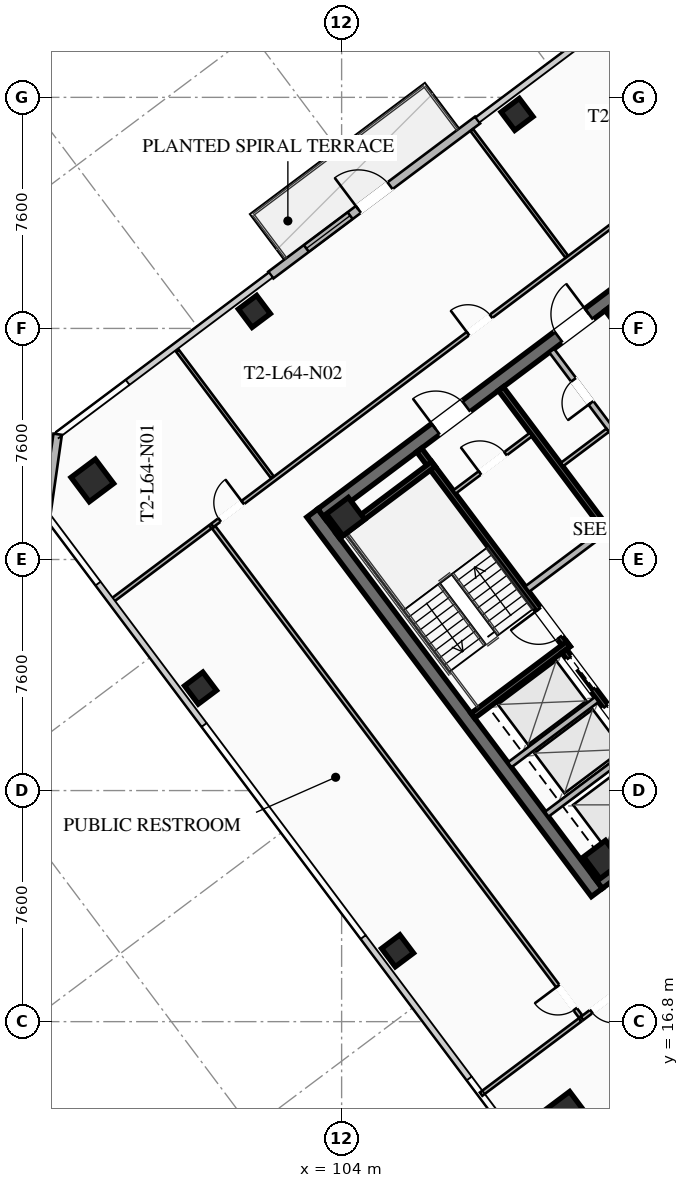
"""IFC4 building model, lengths in metres.
Left out: names, types, materials, properties, quantities, classifications, styles, units other than length and angle.
Written with IfcOpenShell. Run it as: python <this file> out.ifc"""

import sys

from ifc_helpers import new_model, si_unit, direction, frame, frame_2d, origin, origin_2d, place, context, subcontext, project, spatial, rectangle, hollow_rectangle, extrude, element, fill, save


model = new_model("IFC4")
c1 = context("Model", 3, precision=1e-05, world=origin(), true_north=direction((0.0, 1.0)))
c2 = subcontext(c1, "Body", "Model", "MODEL_VIEW")
j1 = project(units=[si_unit("LENGTHUNIT", "METRE"), si_unit("PLANEANGLEUNIT", "RADIAN")], contexts=[c1])
p1 = place(None, origin())
s1 = spatial("IfcSite", under=j1, at=p1, CompositionType="ELEMENT")
p2 = place(p1, origin())
s2 = spatial("IfcBuilding", under=s1, at=p2, CompositionType="ELEMENT")
p3 = place(p2, frame((0.0, 0.0, 236.15)))
s3 = spatial("IfcBuildingStorey", under=s2, at=p3, CompositionType="ELEMENT", Elevation=236.15)
p4 = place(p3, frame((112.396, 21.047, 0.0), z_axis=(0.0, 0.0, 1.0), x_axis=(-0.600005007985, 0.799996243986, 0.0)))
e1 = element("IfcWall", 1, at=p4, inside=s3, PredefinedType="SHEAR", context=c2, shape_type="SweptSolid", body=[
    extrude(rectangle(XDim=15.6, YDim=0.45, at=frame_2d((7.8, 0.0))), origin(), (0.0, 0.0, 1.0), 3.55),
])
p5 = place(p3, frame((124.649, 30.518, 0.0), z_axis=(0.0, 0.0, 1.0), x_axis=(-0.8, -0.6, 0.0)))
e2 = element("IfcWall", 2, at=p5, inside=s3, PredefinedType="SHEAR", context=c2, shape_type="SweptSolid", body=[
    extrude(rectangle(XDim=15.26, YDim=0.45, at=frame_2d((7.63, 0.0))), origin(), (0.0, 0.0, 1.0), 3.55),
])
p6 = place(p5, frame((9.33, 0.0, 0.0)))
e3 = element("IfcOpeningElement", 3, at=p6, cuts=e2, PredefinedType="OPENING", context=c2, shape_type="SweptSolid", body=[
    extrude(rectangle(XDim=1.25, YDim=2.25, at=frame_2d((0.625, 1.125))), frame((0.0, 0.235, 0.0), z_axis=(0.0, -1.0, 0.0), x_axis=(1.0, 0.0, 0.0)), (0.0, 0.0, 1.0), 0.47),
])
p7 = place(p5, frame((4.28, 0.0, 0.0)))
e4 = element("IfcOpeningElement", 4, at=p7, cuts=e2, PredefinedType="OPENING", context=c2, shape_type="SweptSolid", body=[
    extrude(rectangle(XDim=1.25, YDim=2.25, at=frame_2d((0.625, 1.125))), frame((0.0, 0.235, 0.0), z_axis=(0.0, -1.0, 0.0), x_axis=(1.0, 0.0, 0.0)), (0.0, 0.0, 1.0), 0.47),
])
p8 = place(p3, frame((103.351, 33.482, 0.0), z_axis=(0.0, 0.0, 1.0), x_axis=(0.8, 0.6, 0.0)))
e5 = element("IfcWall", 5, at=p8, inside=s3, PredefinedType="SHEAR", context=c2, shape_type="SweptSolid", body=[
    extrude(rectangle(XDim=15.26, YDim=0.45, at=frame_2d((7.63, 0.0))), origin(), (0.0, 0.0, 1.0), 3.55),
])
p9 = place(p8, frame((4.68, 0.0, 0.0)))
e6 = element("IfcOpeningElement", 6, at=p9, cuts=e5, PredefinedType="OPENING", context=c2, shape_type="SweptSolid", body=[
    extrude(rectangle(XDim=1.25, YDim=2.25, at=frame_2d((0.625, 1.125))), frame((0.0, 0.235, 0.0), z_axis=(0.0, -1.0, 0.0), x_axis=(1.0, 0.0, 0.0)), (0.0, 0.0, 1.0), 0.47),
])
p10 = place(p8, frame((9.73, 0.0, 0.0)))
e7 = element("IfcOpeningElement", 7, at=p10, cuts=e5, PredefinedType="OPENING", context=c2, shape_type="SweptSolid", body=[
    extrude(rectangle(XDim=1.25, YDim=2.25, at=frame_2d((0.625, 1.125))), frame((0.0, 0.235, 0.0), z_axis=(0.0, -1.0, 0.0), x_axis=(1.0, 0.0, 0.0)), (0.0, 0.0, 1.0), 0.47),
])
for number, where, z_axis, x_axis in (
    (8, (112.59, 22.13, 0.0), (0.0, 0.0, 1.0), (0.8, 0.6, 0.0)),
    (9, (104.13, 33.41, 0.0), (0.0, 0.0, 1.0), (0.8, 0.6, 0.0)),
):
    element("IfcColumn", number, at=place(p3, frame(where, z_axis=z_axis, x_axis=x_axis)), inside=s3, PredefinedType="COLUMN", context=c2, shape_type="SweptSolid", body=[
        extrude(hollow_rectangle(XDim=0.9, YDim=0.9, WallThickness=0.04, at=origin_2d()), origin(), (0.0, 0.0, 1.0), 3.37),
    ])
for number, where, z_axis, x_axis in (
    (10, (111.4, 13.8, 0.0), (0.0, 0.0, 1.0), (0.8, 0.6, 0.0)),
    (11, (95.8, 34.6, 0.0), (0.0, 0.0, 1.0), (0.8, 0.6, 0.0)),
):
    element("IfcColumn", number, at=place(p3, frame(where, z_axis=z_axis, x_axis=x_axis)), inside=s3, PredefinedType="COLUMN", context=c2, shape_type="SweptSolid", body=[
        extrude(hollow_rectangle(XDim=1.0, YDim=1.0, WallThickness=0.04, at=origin_2d()), origin(), (0.0, 0.0, 1.0), 3.37),
    ])
for number, where, z_axis, x_axis in (
    (12, (109.77, 46.64, 0.0), (0.0, 0.0, 1.0), (0.8, 0.6, 0.0)),
    (13, (101.13, 40.16, 0.0), (0.0, 0.0, 1.0), (0.8, 0.6, 0.0)),
    (14, (99.36, 27.77, 0.0), (0.0, 0.0, 1.0), (0.8, 0.6, 0.0)),
    (15, (105.84, 19.13, 0.0), (0.0, 0.0, 1.0), (0.8, 0.6, 0.0)),
):
    element("IfcColumn", number, at=place(p3, frame(where, z_axis=z_axis, x_axis=x_axis)), inside=s3, PredefinedType="COLUMN", context=c2, shape_type="SweptSolid", body=[
        extrude(hollow_rectangle(XDim=0.75, YDim=0.75, WallThickness=0.032, at=origin_2d()), origin(), (0.0, 0.0, 1.0), 3.37),
    ])
p11 = place(p3, frame((101.672, 41.354, 0.0), z_axis=(0.0, 0.0, 1.0), x_axis=(0.799986212866, 0.600018382406, 0.0)))
e16 = element("IfcWall", 16, at=p11, inside=s3, PredefinedType="SOLIDWALL", context=c2, shape_type="SweptSolid", body=[
    extrude(rectangle(XDim=8.5, YDim=0.28, at=frame_2d((4.25, 0.0))), origin(), (0.0, 0.0, 1.0), 3.37),
])
p12 = place(p11, frame((3.6, 0.0, 0.0)))
e17 = element("IfcOpeningElement", 17, at=p12, cuts=e16, PredefinedType="OPENING", context=c2, shape_type="SweptSolid", body=[
    extrude(rectangle(XDim=1.3, YDim=2.15, at=frame_2d((0.65, 1.075))), frame((0.0, 0.15, 0.0), z_axis=(0.0, -1.0, 0.0), x_axis=(1.0, 0.0, 0.0)), (0.0, 0.0, 1.0), 0.3),
])
p13 = place(p11, frame((1.46, 0.0, 0.85)))
e18 = element("IfcOpeningElement", 18, at=p13, cuts=e16, PredefinedType="OPENING", context=c2, shape_type="SweptSolid", body=[
    extrude(rectangle(XDim=1.8, YDim=1.92, at=frame_2d((0.9, 0.96))), frame((0.0, 0.15, 0.0), z_axis=(0.0, -1.0, 0.0), x_axis=(1.0, 0.0, 0.0)), (0.0, 0.0, 1.0), 0.3),
])
p14 = place(p3, frame((94.28, 33.46, 0.0), z_axis=(0.0, 0.0, 1.0), x_axis=(0.141370477216, 0.989956760759, 0.0)))
e19 = element("IfcWall", 19, at=p14, inside=s3, PredefinedType="SOLIDWALL", context=c2, shape_type="SweptSolid", body=[
    extrude(rectangle(XDim=2.687, YDim=0.28, at=frame_2d((1.344, 0.0))), origin(), (0.0, 0.0, 1.0), 3.37),
])
p15 = place(p3, frame((111.44, 29.08, 0.0), z_axis=(0.0, 0.0, 1.0), x_axis=(-0.59999041401, 0.800007189403, 0.0)))
e20 = element("IfcWall", 20, at=p15, inside=s3, PredefinedType="SHEAR", context=c2, shape_type="SweptSolid", body=[
    extrude(rectangle(XDim=8.15, YDim=0.2, at=frame_2d((4.075, 0.0))), origin(), (0.0, 0.0, 1.0), 3.37),
])
p16 = place(p15, frame((0.45, 0.0, 0.0)))
e21 = element("IfcOpeningElement", 21, at=p16, cuts=e20, PredefinedType="OPENING", context=c2, shape_type="SweptSolid", body=[
    extrude(rectangle(XDim=1.15, YDim=2.2, at=frame_2d((0.575, 1.1))), frame((0.0, 0.11, 0.0), z_axis=(0.0, -1.0, 0.0), x_axis=(1.0, 0.0, 0.0)), (0.0, 0.0, 1.0), 0.22),
])
for number, where, z_axis, x_axis in (
    (22, (108.316, 26.862, 0.0), (0.0, 0.0, 1.0), (0.8, 0.6, 0.0)),
    (23, (103.876, 32.782, 0.0), (0.0, 0.0, 1.0), (0.8, 0.6, 0.0)),
):
    element("IfcWall", number, at=place(p3, frame(where, z_axis=z_axis, x_axis=x_axis)), inside=s3, PredefinedType="SHEAR", context=c2, shape_type="SweptSolid", body=[
        extrude(rectangle(XDim=3.93, YDim=0.2, at=frame_2d((1.965, 0.0))), origin(), (0.0, 0.0, 1.0), 3.37),
    ])
p17 = place(p3, frame((118.058, 25.856, 0.0), z_axis=(0.0, 0.0, 1.0), x_axis=(-0.600002657301, 0.799998007018, 0.0)))
e24 = element("IfcWall", 24, at=p17, inside=s3, PredefinedType="SHEAR", context=c2, shape_type="SweptSolid", body=[
    extrude(rectangle(XDim=14.7, YDim=0.2, at=frame_2d((7.35, 0.0))), origin(), (0.0, 0.0, 1.0), 3.37),
])
p18 = place(p3, frame((110.104, 31.028, 0.0), z_axis=(0.0, 0.0, 1.0), x_axis=(0.800018601094, 0.59997519774, 0.0)))
e25 = element("IfcWall", 25, at=p18, inside=s3, PredefinedType="SOLIDWALL", context=c2, shape_type="SweptSolid", body=[
    extrude(rectangle(XDim=3.15, YDim=0.22, at=frame_2d((1.575, 0.0))), origin(), (0.0, 0.0, 1.0), 2.723),
])
p19 = place(p3, frame((115.25, 23.75, 0.0), z_axis=(0.0, 0.0, 1.0), x_axis=(-0.599994036198, 0.800004472816, 0.0)))
e26 = element("IfcWall", 26, at=p19, inside=s3, PredefinedType="SHEAR", context=c2, shape_type="SweptSolid", body=[
    extrude(rectangle(XDim=6.55, YDim=0.2, at=frame_2d((3.275, 0.0))), origin(), (0.0, 0.0, 1.0), 3.37),
])
p20 = place(p19, frame((4.975, 0.0, 0.0)))
e27 = element("IfcOpeningElement", 27, at=p20, cuts=e26, PredefinedType="OPENING", context=c2, shape_type="SweptSolid", body=[
    extrude(rectangle(XDim=1.3, YDim=2.25, at=frame_2d((0.65, 1.125))), frame((0.0, 0.11, 0.0), z_axis=(0.0, -1.0, 0.0), x_axis=(1.0, 0.0, 0.0)), (0.0, 0.0, 1.0), 0.22),
])
p21 = place(p19, frame((2.975, 0.0, 0.0)))
e28 = element("IfcOpeningElement", 28, at=p21, cuts=e26, PredefinedType="OPENING", context=c2, shape_type="SweptSolid", body=[
    extrude(rectangle(XDim=1.3, YDim=2.25, at=frame_2d((0.65, 1.125))), frame((0.0, 0.11, 0.0), z_axis=(0.0, -1.0, 0.0), x_axis=(1.0, 0.0, 0.0)), (0.0, 0.0, 1.0), 0.22),
])
p22 = place(p19, frame((0.775, 0.0, 0.0)))
e29 = element("IfcOpeningElement", 29, at=p22, cuts=e26, PredefinedType="OPENING", context=c2, shape_type="SweptSolid", body=[
    extrude(rectangle(XDim=1.3, YDim=2.25, at=frame_2d((0.65, 1.125))), frame((0.0, 0.11, 0.0), z_axis=(0.0, -1.0, 0.0), x_axis=(1.0, 0.0, 0.0)), (0.0, 0.0, 1.0), 0.22),
])
for number, where, z_axis, x_axis in (
    (30, (110.746, 23.622, 0.0), (0.0, 0.0, 1.0), (0.8, 0.6, 0.0)),
    (31, (109.528, 25.246, 0.0), (0.0, 0.0, 1.0), (0.8, 0.6, 0.0)),
):
    element("IfcWall", number, at=place(p3, frame(where, z_axis=z_axis, x_axis=x_axis)), inside=s3, PredefinedType="SOLIDWALL", context=c2, shape_type="SweptSolid", body=[
        extrude(rectangle(XDim=3.58, YDim=0.2, at=frame_2d((1.79, 0.0))), origin(), (0.0, 0.0, 1.0), 3.37),
    ])
p23 = place(p3, frame((112.75, 40.25, 0.0), z_axis=(0.0, 0.0, 1.0), x_axis=(0.599994036198, -0.800004472816, 0.0)))
e32 = element("IfcWall", 32, at=p23, inside=s3, PredefinedType="SHEAR", context=c2, shape_type="SweptSolid", body=[
    extrude(rectangle(XDim=6.55, YDim=0.2, at=frame_2d((3.275, 0.0))), origin(), (0.0, 0.0, 1.0), 3.37),
])
p24 = place(p23, frame((5.075, 0.0, 0.0)))
e33 = element("IfcOpeningElement", 33, at=p24, cuts=e32, PredefinedType="OPENING", context=c2, shape_type="SweptSolid", body=[
    extrude(rectangle(XDim=1.1, YDim=2.2, at=frame_2d((0.55, 1.1))), frame((0.0, 0.11, 0.0), z_axis=(0.0, -1.0, 0.0), x_axis=(1.0, 0.0, 0.0)), (0.0, 0.0, 1.0), 0.22),
])
p25 = place(p23, frame((3.025, 0.0, 0.0)))
e34 = element("IfcOpeningElement", 34, at=p25, cuts=e32, PredefinedType="OPENING", context=c2, shape_type="SweptSolid", body=[
    extrude(rectangle(XDim=1.1, YDim=2.2, at=frame_2d((0.55, 1.1))), frame((0.0, 0.11, 0.0), z_axis=(0.0, -1.0, 0.0), x_axis=(1.0, 0.0, 0.0)), (0.0, 0.0, 1.0), 0.22),
])
p26 = place(p23, frame((1.025, 0.0, 0.0)))
e35 = element("IfcOpeningElement", 35, at=p26, cuts=e32, PredefinedType="OPENING", context=c2, shape_type="SweptSolid", body=[
    extrude(rectangle(XDim=1.1, YDim=2.2, at=frame_2d((0.55, 1.1))), frame((0.0, 0.11, 0.0), z_axis=(0.0, -1.0, 0.0), x_axis=(1.0, 0.0, 0.0)), (0.0, 0.0, 1.0), 0.22),
])
p27 = place(p3, frame((107.71, 34.22, 0.0), z_axis=(0.0, 0.0, 1.0), x_axis=(0.799981399002, 0.60002480053, 0.0)))
e36 = element("IfcWall", 36, at=p27, inside=s3, PredefinedType="PARTITIONING", context=c2, shape_type="SweptSolid", body=[
    extrude(rectangle(XDim=3.15, YDim=0.135, at=frame_2d((1.575, 0.0))), origin(), (0.0, 0.0, 1.0), 2.723),
])
p28 = place(p27, frame((1.05, 0.0, 0.0)))
e37 = element("IfcOpeningElement", 37, at=p28, cuts=e36, PredefinedType="OPENING", context=c2, shape_type="SweptSolid", body=[
    extrude(rectangle(XDim=1.05, YDim=2.2, at=frame_2d((0.525, 1.1))), frame((0.0, 0.077, 0.0), z_axis=(0.0, -1.0, 0.0), x_axis=(1.0, 0.0, 0.0)), (0.0, 0.0, 1.0), 0.155),
])
p29 = place(p3, frame((115.11, 33.27, 0.0), z_axis=(0.0, 0.0, 1.0), x_axis=(-0.600011160345, 0.79999162962, 0.0)))
e38 = element("IfcWall", 38, at=p29, inside=s3, PredefinedType="SOLIDWALL", context=c2, shape_type="SweptSolid", body=[
    extrude(rectangle(XDim=7.0, YDim=0.2, at=frame_2d((3.5, 0.0))), origin(), (0.0, 0.0, 1.0), 2.723),
])
p30 = place(p29, frame((0.85, 0.0, 0.0)))
e39 = element("IfcOpeningElement", 39, at=p30, cuts=e38, PredefinedType="OPENING", context=c2, shape_type="SweptSolid", body=[
    extrude(rectangle(XDim=0.95, YDim=2.05, at=frame_2d((0.475, 1.025))), frame((0.0, 0.11, 0.0), z_axis=(0.0, -1.0, 0.0), x_axis=(1.0, 0.0, 0.0)), (0.0, 0.0, 1.0), 0.22),
])
p31 = place(p29, frame((4.85, 0.0, 0.0)))
e40 = element("IfcOpeningElement", 40, at=p31, cuts=e38, PredefinedType="OPENING", context=c2, shape_type="SweptSolid", body=[
    extrude(rectangle(XDim=0.95, YDim=2.05, at=frame_2d((0.475, 1.025))), frame((0.0, 0.11, 0.0), z_axis=(0.0, -1.0, 0.0), x_axis=(1.0, 0.0, 0.0)), (0.0, 0.0, 1.0), 0.22),
])
p32 = place(p3, frame((111.246, 35.122, 0.0), z_axis=(0.0, 0.0, 1.0), x_axis=(0.8, 0.6, 0.0)))
e41 = element("IfcWall", 41, at=p32, inside=s3, PredefinedType="PARTITIONING", context=c2, shape_type="SweptSolid", body=[
    extrude(rectangle(XDim=1.88, YDim=0.135, at=frame_2d((0.94, 0.0))), origin(), (0.0, 0.0, 1.0), 2.723),
])
p33 = place(p3, frame((99.746, 33.122, 0.0), z_axis=(0.0, 0.0, 1.0), x_axis=(0.800001242445, 0.599998343403, 0.0)))
e42 = element("IfcWall", 42, at=p33, inside=s3, PredefinedType="PARTITIONING", context=c2, shape_type="SweptSolid", body=[
    extrude(rectangle(XDim=23.58, YDim=0.135, at=frame_2d((11.79, 0.0))), origin(), (0.0, 0.0, 1.0), 2.723),
])
p34 = place(p33, frame((0.3, 0.0, 0.0)))
e43 = element("IfcOpeningElement", 43, at=p34, cuts=e42, PredefinedType="OPENING", context=c2, shape_type="SweptSolid", body=[
    extrude(rectangle(XDim=0.95, YDim=2.05, at=frame_2d((0.475, 1.025))), frame((0.0, 0.077, 0.0), z_axis=(0.0, -1.0, 0.0), x_axis=(1.0, 0.0, 0.0)), (0.0, 0.0, 1.0), 0.155),
])
p35 = place(p33, frame((10.512, 0.0, 0.0)))
e44 = element("IfcOpeningElement", 44, at=p35, cuts=e42, PredefinedType="OPENING", context=c2, shape_type="SweptSolid", body=[
    extrude(rectangle(XDim=0.95, YDim=2.05, at=frame_2d((0.475, 1.025))), frame((0.0, 0.077, 0.0), z_axis=(0.0, -1.0, 0.0), x_axis=(1.0, 0.0, 0.0)), (0.0, 0.0, 1.0), 0.155),
])
p36 = place(p33, frame((22.33, 0.0, 0.0)))
e45 = element("IfcOpeningElement", 45, at=p36, cuts=e42, PredefinedType="OPENING", context=c2, shape_type="SweptSolid", body=[
    extrude(rectangle(XDim=0.95, YDim=2.05, at=frame_2d((0.475, 1.025))), frame((0.0, 0.077, 0.0), z_axis=(0.0, -1.0, 0.0), x_axis=(1.0, 0.0, 0.0)), (0.0, 0.0, 1.0), 0.155),
])
for number, where, z_axis, x_axis in (
    (46, (101.722, 34.704, 0.0), (0.0, 0.0, 1.0), (-0.6, 0.8, 0.0)),
    (47, (111.402, 41.964, 0.0), (0.0, 0.0, 1.0), (-0.6, 0.8, 0.0)),
):
    element("IfcWall", number, at=place(p3, frame(where, z_axis=z_axis, x_axis=x_axis)), inside=s3, PredefinedType="PARTITIONING", context=c2, shape_type="SweptSolid", body=[
        extrude(rectangle(XDim=5.2, YDim=0.11, at=frame_2d((2.6, 0.0))), origin(), (0.0, 0.0, 1.0), 2.723),
    ])
p37 = place(p3, frame((124.012, 25.984, 0.0), z_axis=(0.0, 0.0, 1.0), x_axis=(-0.800003872688, -0.599994836382, 0.0)))
e48 = element("IfcWall", 48, at=p37, inside=s3, PredefinedType="PARTITIONING", context=c2, shape_type="SweptSolid", body=[
    extrude(rectangle(XDim=15.13, YDim=0.135, at=frame_2d((7.565, 0.0))), origin(), (0.0, 0.0, 1.0), 2.723),
])
p38 = place(p37, frame((13.8, 0.0, 0.0)))
e49 = element("IfcOpeningElement", 49, at=p38, cuts=e48, PredefinedType="OPENING", context=c2, shape_type="SweptSolid", body=[
    extrude(rectangle(XDim=0.95, YDim=2.05, at=frame_2d((0.475, 1.025))), frame((0.0, 0.077, 0.0), z_axis=(0.0, -1.0, 0.0), x_axis=(1.0, 0.0, 0.0)), (0.0, 0.0, 1.0), 0.155),
])
p39 = place(p37, frame((3.813, 0.0, 0.0)))
e50 = element("IfcOpeningElement", 50, at=p39, cuts=e48, PredefinedType="OPENING", context=c2, shape_type="SweptSolid", body=[
    extrude(rectangle(XDim=0.95, YDim=2.05, at=frame_2d((0.475, 1.025))), frame((0.0, 0.077, 0.0), z_axis=(0.0, -1.0, 0.0), x_axis=(1.0, 0.0, 0.0)), (0.0, 0.0, 1.0), 0.155),
])
p40 = place(p3, frame((111.86, 16.97, 0.0), z_axis=(0.0, 0.0, 1.0), x_axis=(-0.60000194242, 0.799998543181, 0.0)))
e51 = element("IfcWall", 51, at=p40, inside=s3, PredefinedType="PARTITIONING", context=c2, shape_type="SweptSolid", body=[
    extrude(rectangle(XDim=20.11, YDim=0.135, at=frame_2d((10.055, 0.0))), origin(), (0.0, 0.0, 1.0), 2.723),
])
p41 = place(p40, frame((0.3, 0.0, 0.0)))
e52 = element("IfcOpeningElement", 52, at=p41, cuts=e51, PredefinedType="OPENING", context=c2, shape_type="SweptSolid", body=[
    extrude(rectangle(XDim=0.95, YDim=2.05, at=frame_2d((0.475, 1.025))), frame((0.0, 0.077, 0.0), z_axis=(0.0, -1.0, 0.0), x_axis=(1.0, 0.0, 0.0)), (0.0, 0.0, 1.0), 0.155),
])
p42 = place(p3, frame((99.682, 33.074, 0.0), z_axis=(0.0, 0.0, 1.0), x_axis=(-0.8, -0.6, 0.0)))
e53 = element("IfcWall", 53, at=p42, inside=s3, PredefinedType="PARTITIONING", context=c2, shape_type="SweptSolid", body=[
    extrude(rectangle(XDim=4.07, YDim=0.135, at=frame_2d((2.035, 0.0))), origin(), (0.0, 0.0, 1.0), 2.723),
])
p43 = place(p3, frame((108.588, 14.416, 0.0), z_axis=(0.0, 0.0, 1.0), x_axis=(0.800021594126, 0.599971206752, 0.0)))
e54 = element("IfcWall", 54, at=p43, inside=s3, PredefinedType="PARTITIONING", context=c2, shape_type="SweptSolid", body=[
    extrude(rectangle(XDim=4.07, YDim=0.135, at=frame_2d((2.035, 0.0))), origin(), (0.0, 0.0, 1.0), 2.723),
])
p44 = place(p12, origin())
e55 = element("IfcDoor", 55, at=p44, inside=s3, OperationType="SINGLE_SWING_LEFT", PredefinedType="DOOR", context=c2, shape_type="SweptSolid", body=[
    extrude(rectangle(XDim=1.3, YDim=2.15, at=frame_2d((0.65, 1.075))), frame((0.0, 0.025, 0.0), z_axis=(0.0, -1.0, 0.0), x_axis=(1.0, 0.0, 0.0)), (0.0, 0.0, 1.0), 0.05),
])
fill(e17, e55)
p45 = place(p13, origin())
e56 = element("IfcWindow", 56, at=p45, inside=s3, PartitioningType="SINGLE_PANEL", PredefinedType="WINDOW", context=c2, shape_type="SweptSolid", body=[
    extrude(rectangle(XDim=1.8, YDim=1.92, at=frame_2d((0.9, 0.96))), frame((0.0, 0.03, 0.0), z_axis=(0.0, -1.0, 0.0), x_axis=(1.0, 0.0, 0.0)), (0.0, 0.0, 1.0), 0.06),
])
fill(e18, e56)
p46 = place(p9, origin())
e57 = element("IfcDoor", 57, at=p46, inside=s3, OperationType="SINGLE_SWING_LEFT", PredefinedType="DOOR", context=c2, shape_type="SweptSolid", body=[
    extrude(rectangle(XDim=1.25, YDim=2.25, at=frame_2d((0.625, 1.125))), frame((0.0, 0.025, 0.0), z_axis=(0.0, -1.0, 0.0), x_axis=(1.0, 0.0, 0.0)), (0.0, 0.0, 1.0), 0.05),
])
fill(e6, e57)
p47 = place(p10, origin())
e58 = element("IfcDoor", 58, at=p47, inside=s3, OperationType="SINGLE_SWING_RIGHT", PredefinedType="DOOR", context=c2, shape_type="SweptSolid", body=[
    extrude(rectangle(XDim=1.25, YDim=2.25, at=frame_2d((0.625, 1.125))), frame((0.0, 0.025, 0.0), z_axis=(0.0, -1.0, 0.0), x_axis=(1.0, 0.0, 0.0)), (0.0, 0.0, 1.0), 0.05),
])
fill(e7, e58)
p48 = place(p16, origin())
e59 = element("IfcDoor", 59, at=p48, inside=s3, OperationType="SINGLE_SWING_RIGHT", PredefinedType="DOOR", context=c2, shape_type="SweptSolid", body=[
    extrude(rectangle(XDim=1.15, YDim=2.2, at=frame_2d((0.575, 1.1))), frame((0.0, 0.025, 0.0), z_axis=(0.0, -1.0, 0.0), x_axis=(1.0, 0.0, 0.0)), (0.0, 0.0, 1.0), 0.05),
])
fill(e21, e59)
p49 = place(p28, origin())
e60 = element("IfcDoor", 60, at=p49, inside=s3, OperationType="SINGLE_SWING_LEFT", PredefinedType="DOOR", context=c2, shape_type="SweptSolid", body=[
    extrude(rectangle(XDim=1.05, YDim=2.2, at=frame_2d((0.525, 1.1))), frame((0.0, 0.025, 0.0), z_axis=(0.0, -1.0, 0.0), x_axis=(1.0, 0.0, 0.0)), (0.0, 0.0, 1.0), 0.05),
])
fill(e37, e60)
p50 = place(p31, origin())
e61 = element("IfcDoor", 61, at=p50, inside=s3, OperationType="SINGLE_SWING_LEFT", PredefinedType="DOOR", context=c2, shape_type="SweptSolid", body=[
    extrude(rectangle(XDim=0.95, YDim=2.05, at=frame_2d((0.475, 1.025))), frame((0.0, 0.025, 0.0), z_axis=(0.0, -1.0, 0.0), x_axis=(1.0, 0.0, 0.0)), (0.0, 0.0, 1.0), 0.05),
])
fill(e40, e61)
p51 = place(p34, origin())
e62 = element("IfcDoor", 62, at=p51, inside=s3, OperationType="SINGLE_SWING_RIGHT", PredefinedType="DOOR", context=c2, shape_type="SweptSolid", body=[
    extrude(rectangle(XDim=0.95, YDim=2.05, at=frame_2d((0.475, 1.025))), frame((0.0, 0.025, 0.0), z_axis=(0.0, -1.0, 0.0), x_axis=(1.0, 0.0, 0.0)), (0.0, 0.0, 1.0), 0.05),
])
fill(e43, e62)
p52 = place(p35, origin())
e63 = element("IfcDoor", 63, at=p52, inside=s3, OperationType="SINGLE_SWING_LEFT", PredefinedType="DOOR", context=c2, shape_type="SweptSolid", body=[
    extrude(rectangle(XDim=0.95, YDim=2.05, at=frame_2d((0.475, 1.025))), frame((0.0, 0.025, 0.0), z_axis=(0.0, -1.0, 0.0), x_axis=(1.0, 0.0, 0.0)), (0.0, 0.0, 1.0), 0.05),
])
fill(e44, e63)
p53 = place(p38, origin())
e64 = element("IfcDoor", 64, at=p53, inside=s3, OperationType="SINGLE_SWING_LEFT", PredefinedType="DOOR", context=c2, shape_type="SweptSolid", body=[
    extrude(rectangle(XDim=0.95, YDim=2.05, at=frame_2d((0.475, 1.025))), frame((0.0, 0.025, 0.0), z_axis=(0.0, -1.0, 0.0), x_axis=(1.0, 0.0, 0.0)), (0.0, 0.0, 1.0), 0.05),
])
fill(e49, e64)
p54 = place(p41, origin())
e65 = element("IfcDoor", 65, at=p54, inside=s3, OperationType="SINGLE_SWING_RIGHT", PredefinedType="DOOR", context=c2, shape_type="SweptSolid", body=[
    extrude(rectangle(XDim=0.95, YDim=2.05, at=frame_2d((0.475, 1.025))), frame((0.0, 0.025, 0.0), z_axis=(0.0, -1.0, 0.0), x_axis=(1.0, 0.0, 0.0)), (0.0, 0.0, 1.0), 0.05),
])
fill(e52, e65)
p55 = place(p20, origin())
e66 = element("IfcDoor", 66, at=p55, inside=s3, OperationType="SLIDING_TO_LEFT", PredefinedType="DOOR", context=c2, shape_type="SweptSolid", body=[
    extrude(rectangle(XDim=1.3, YDim=2.25, at=frame_2d((0.65, 1.125))), frame((0.0, 0.025, 0.0), z_axis=(0.0, -1.0, 0.0), x_axis=(1.0, 0.0, 0.0)), (0.0, 0.0, 1.0), 0.05),
])
fill(e27, e66)
p56 = place(p21, origin())
e67 = element("IfcDoor", 67, at=p56, inside=s3, OperationType="SLIDING_TO_LEFT", PredefinedType="DOOR", context=c2, shape_type="SweptSolid", body=[
    extrude(rectangle(XDim=1.3, YDim=2.25, at=frame_2d((0.65, 1.125))), frame((0.0, 0.025, 0.0), z_axis=(0.0, -1.0, 0.0), x_axis=(1.0, 0.0, 0.0)), (0.0, 0.0, 1.0), 0.05),
])
fill(e28, e67)
save(model, sys.argv[1])
